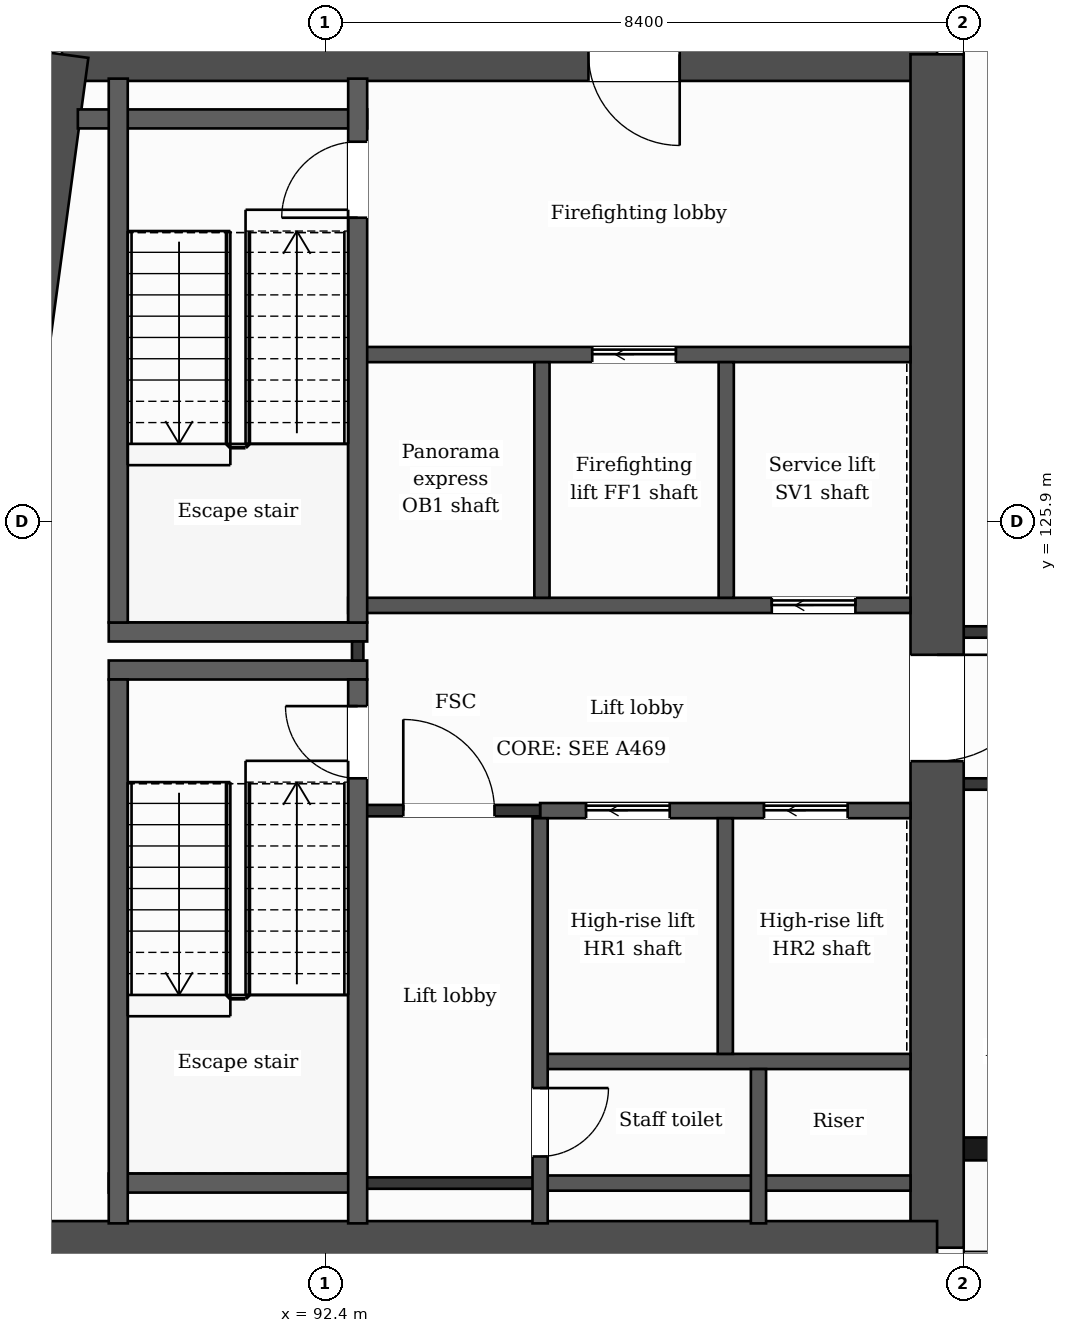
"""IFC4 building model, lengths in metres.
Left out: names, types, materials, properties, quantities, classifications, styles, units other than length and angle.
Written with IfcOpenShell. Run it as: python <this file> out.ifc"""

import sys

from ifc_helpers import new_model, si_unit, direction, frame, frame_2d, origin, place, context, subcontext, project, spatial, rectangle, extrude, element, fill, save


model = new_model("IFC4")
c1 = context("Model", 3, precision=1e-05, world=origin(), true_north=direction((0.0, 1.0)))
c2 = subcontext(c1, "Body", "Model", "MODEL_VIEW")
j1 = project(units=[si_unit("LENGTHUNIT", "METRE"), si_unit("PLANEANGLEUNIT", "RADIAN")], contexts=[c1])
p1 = place(None, origin())
s1 = spatial("IfcSite", under=j1, at=p1, CompositionType="ELEMENT")
p2 = place(p1, origin())
s2 = spatial("IfcBuilding", under=s1, at=p2, CompositionType="ELEMENT")
p3 = place(p2, frame((0.0, 0.0, 281.2)))
s3 = spatial("IfcBuildingStorey", under=s2, at=p3, CompositionType="ELEMENT", Elevation=281.2)
p4 = place(p3, frame((88.937, 132.05, 0.0), z_axis=(0.0, 0.0, 1.0), x_axis=(1.0, 0.0, 0.0)))
e1 = element("IfcWall", 1, at=p4, inside=s3, PredefinedType="SHEAR", context=c2, shape_type="SweptSolid", body=[
    extrude(rectangle(XDim=11.513, YDim=0.7, at=frame_2d((5.757, 0.0))), origin(), (0.0, 0.0, 1.0), 3.7),
])
p5 = place(p4, frame((6.927, 0.0, 0.0)))
e2 = element("IfcOpeningElement", 2, at=p5, cuts=e1, PredefinedType="OPENING", context=c2, shape_type="SweptSolid", body=[
    extrude(rectangle(XDim=1.2, YDim=2.1, at=frame_2d((0.6, 1.05))), frame((0.0, 0.36, 0.0), z_axis=(0.0, -1.0, 0.0), x_axis=(1.0, 0.0, 0.0)), (0.0, 0.0, 1.0), 0.72),
])
p6 = place(p3, frame((100.45, 132.05, 0.0), z_axis=(0.0, 0.0, 1.0), x_axis=(0.0, -1.0, 0.0)))
e3 = element("IfcWall", 3, at=p6, inside=s3, PredefinedType="SHEAR", context=c2, shape_type="SweptSolid", body=[
    extrude(rectangle(XDim=15.7, YDim=0.7, at=frame_2d((7.85, 0.0))), origin(), (0.0, 0.0, 1.0), 3.7),
])
p7 = place(p6, frame((7.9, 0.0, 0.0)))
e4 = element("IfcOpeningElement", 4, at=p7, cuts=e3, PredefinedType="OPENING", context=c2, shape_type="SweptSolid", body=[
    extrude(rectangle(XDim=1.4, YDim=2.1, at=frame_2d((0.7, 1.05))), frame((0.0, 0.36, 0.0), z_axis=(0.0, -1.0, 0.0), x_axis=(1.0, 0.0, 0.0)), (0.0, 0.0, 1.0), 0.72),
])
p8 = place(p3, frame((100.45, 116.35, 0.0), z_axis=(0.0, 0.0, 1.0), x_axis=(-1.0, 0.0, 0.0)))
e5 = element("IfcWall", 5, at=p8, inside=s3, PredefinedType="SHEAR", context=c2, shape_type="SweptSolid", body=[
    extrude(rectangle(XDim=13.627, YDim=0.7, at=frame_2d((6.813, 0.0))), origin(), (0.0, 0.0, 1.0), 3.7),
])
p9 = place(p3, frame((86.823, 116.35, 0.0), z_axis=(0.0, 0.0, 1.0), x_axis=(0.133416378607, 0.99106007382, 0.0)))
e6 = element("IfcWall", 6, at=p9, inside=s3, PredefinedType="SHEAR", context=c2, shape_type="SweptSolid", body=[
    extrude(rectangle(XDim=15.842, YDim=0.7, at=frame_2d((7.921, 0.0))), origin(), (0.0, 0.0, 1.0), 3.7),
])
p10 = place(p3, frame((100.8, 117.65, 0.0), z_axis=(0.0, 0.0, 1.0), x_axis=(1.0, 0.0, 0.0)))
e7 = element("IfcWall", 7, at=p10, inside=s3, PredefinedType="SOLIDWALL", context=c2, shape_type="SweptSolid", body=[
    extrude(rectangle(XDim=12.75, YDim=0.3, at=frame_2d((6.375, 0.0))), origin(), (0.0, 0.0, 1.0), 3.38),
])
p11 = place(p10, frame((1.55, 0.0, 0.9)))
e8 = element("IfcOpeningElement", 8, at=p11, cuts=e7, PredefinedType="OPENING", context=c2, shape_type="SweptSolid", body=[
    extrude(rectangle(XDim=1.2, YDim=2.1, at=frame_2d((0.6, 1.05))), frame((0.0, 0.16, 0.0), z_axis=(0.0, -1.0, 0.0), x_axis=(1.0, 0.0, 0.0)), (0.0, 0.0, 1.0), 0.32),
])
p12 = place(p10, frame((5.7, 0.0, 0.9)))
e9 = element("IfcOpeningElement", 9, at=p12, cuts=e7, PredefinedType="OPENING", context=c2, shape_type="SweptSolid", body=[
    extrude(rectangle(XDim=1.2, YDim=2.1, at=frame_2d((0.6, 1.05))), frame((0.0, 0.16, 0.0), z_axis=(0.0, -1.0, 0.0), x_axis=(1.0, 0.0, 0.0)), (0.0, 0.0, 1.0), 0.32),
])
p13 = place(p10, frame((9.0, 0.0, 0.0)))
e10 = element("IfcOpeningElement", 10, at=p13, cuts=e7, PredefinedType="OPENING", context=c2, shape_type="SweptSolid", body=[
    extrude(rectangle(XDim=1.2, YDim=2.4, at=frame_2d((0.6, 1.2))), frame((0.0, 0.16, 0.0), z_axis=(0.0, -1.0, 0.0), x_axis=(1.0, 0.0, 0.0)), (0.0, 0.0, 1.0), 0.32),
])
p14 = place(p10, frame((10.8, 0.0, 0.9)))
e11 = element("IfcOpeningElement", 11, at=p14, cuts=e7, PredefinedType="OPENING", context=c2, shape_type="SweptSolid", body=[
    extrude(rectangle(XDim=1.2, YDim=2.1, at=frame_2d((0.6, 1.05))), frame((0.0, 0.16, 0.0), z_axis=(0.0, -1.0, 0.0), x_axis=(1.0, 0.0, 0.0)), (0.0, 0.0, 1.0), 0.32),
])
p15 = place(p3, frame((95.227, 117.2, 0.0), z_axis=(0.0, 0.0, 1.0), x_axis=(1.0, 0.0, 0.0)))
e12 = element("IfcWall", 12, at=p15, inside=s3, PredefinedType="PARTITIONING", context=c2, shape_type="SweptSolid", body=[
    extrude(rectangle(XDim=4.873, YDim=0.2, at=frame_2d((2.437, 0.0))), origin(), (0.0, 0.0, 1.0), 3.38),
])
p16 = place(p3, frame((92.827, 117.2, 0.0), z_axis=(0.0, 0.0, 1.0), x_axis=(1.0, 0.0, 0.0)))
e13 = element("IfcWall", 13, at=p16, inside=s3, PredefinedType="PARTITIONING", context=c2, shape_type="SweptSolid", body=[
    extrude(rectangle(XDim=2.4, YDim=0.15, at=frame_2d((1.2, 0.0))), origin(), (0.0, 0.0, 1.0), 3.38),
])
p17 = place(p3, frame((89.552, 117.2, 0.0), z_axis=(0.0, 0.0, 1.0), x_axis=(1.0, 0.0, 0.0)))
e14 = element("IfcWall", 14, at=p17, inside=s3, PredefinedType="PARTITIONING", context=c2, shape_type="SweptSolid", body=[
    extrude(rectangle(XDim=3.275, YDim=0.25, at=frame_2d((1.637, 0.0))), origin(), (0.0, 0.0, 1.0), 3.38),
])
p18 = place(p3, frame((95.227, 118.8, 0.0), z_axis=(0.0, 0.0, 1.0), x_axis=(1.0, 0.0, 0.0)))
e15 = element("IfcWall", 15, at=p18, inside=s3, PredefinedType="PARTITIONING", context=c2, shape_type="SweptSolid", body=[
    extrude(rectangle(XDim=4.873, YDim=0.2, at=frame_2d((2.437, 0.0))), origin(), (0.0, 0.0, 1.0), 3.38),
])
p19 = place(p3, frame((95.227, 122.1, 0.0), z_axis=(0.0, 0.0, 1.0), x_axis=(1.0, 0.0, 0.0)))
e16 = element("IfcWall", 16, at=p19, inside=s3, PredefinedType="PARTITIONING", context=c2, shape_type="SweptSolid", body=[
    extrude(rectangle(XDim=4.873, YDim=0.2, at=frame_2d((2.437, 0.0))), origin(), (0.0, 0.0, 1.0), 3.38),
])
p20 = place(p19, frame((0.605, 0.0, 0.0)))
e17 = element("IfcOpeningElement", 17, at=p20, cuts=e16, PredefinedType="OPENING", context=c2, shape_type="SweptSolid", body=[
    extrude(rectangle(XDim=1.1, YDim=2.1, at=frame_2d((0.55, 1.05))), frame((0.0, 0.11, 0.0), z_axis=(0.0, -1.0, 0.0), x_axis=(1.0, 0.0, 0.0)), (0.0, 0.0, 1.0), 0.22),
])
p21 = place(p19, frame((2.946, 0.0, 0.0)))
e18 = element("IfcOpeningElement", 18, at=p21, cuts=e16, PredefinedType="OPENING", context=c2, shape_type="SweptSolid", body=[
    extrude(rectangle(XDim=1.1, YDim=2.1, at=frame_2d((0.55, 1.05))), frame((0.0, 0.11, 0.0), z_axis=(0.0, -1.0, 0.0), x_axis=(1.0, 0.0, 0.0)), (0.0, 0.0, 1.0), 0.22),
])
p22 = place(p3, frame((92.827, 122.1, 0.0), z_axis=(0.0, 0.0, 1.0), x_axis=(1.0, 0.0, 0.0)))
e19 = element("IfcWall", 19, at=p22, inside=s3, PredefinedType="PARTITIONING", context=c2, shape_type="SweptSolid", body=[
    extrude(rectangle(XDim=2.4, YDim=0.15, at=frame_2d((1.2, 0.0))), origin(), (0.0, 0.0, 1.0), 3.38),
])
p23 = place(p22, frame((0.6, 0.0, 0.0)))
e20 = element("IfcOpeningElement", 20, at=p23, cuts=e19, PredefinedType="OPENING", context=c2, shape_type="SweptSolid", body=[
    extrude(rectangle(XDim=1.2, YDim=2.1, at=frame_2d((0.6, 1.05))), frame((0.0, 0.085, 0.0), z_axis=(0.0, -1.0, 0.0), x_axis=(1.0, 0.0, 0.0)), (0.0, 0.0, 1.0), 0.17),
])
p24 = place(p3, frame((100.8, 122.45, 0.0), z_axis=(0.0, 0.0, 1.0), x_axis=(1.0, 0.0, 0.0)))
e21 = element("IfcWall", 21, at=p24, inside=s3, PredefinedType="PARTITIONING", context=c2, shape_type="SweptSolid", body=[
    extrude(rectangle(XDim=25.2, YDim=0.15, at=frame_2d((12.6, 0.0))), origin(), (0.0, 0.0, 1.0), 3.38),
])
p25 = place(p24, frame((0.55, 0.0, 0.0)))
e22 = element("IfcOpeningElement", 22, at=p25, cuts=e21, PredefinedType="OPENING", context=c2, shape_type="SweptSolid", body=[
    extrude(rectangle(XDim=1.0, YDim=2.1, at=frame_2d((0.5, 1.05))), frame((0.0, 0.085, 0.0), z_axis=(0.0, -1.0, 0.0), x_axis=(1.0, 0.0, 0.0)), (0.0, 0.0, 1.0), 0.17),
])
p26 = place(p24, frame((9.375, 0.0, 0.0)))
e23 = element("IfcOpeningElement", 23, at=p26, cuts=e21, PredefinedType="OPENING", context=c2, shape_type="SweptSolid", body=[
    extrude(rectangle(XDim=1.0, YDim=2.1, at=frame_2d((0.5, 1.05))), frame((0.0, 0.085, 0.0), z_axis=(0.0, -1.0, 0.0), x_axis=(1.0, 0.0, 0.0)), (0.0, 0.0, 1.0), 0.17),
])
p27 = place(p24, frame((13.23, 0.0, 0.0)))
e24 = element("IfcOpeningElement", 24, at=p27, cuts=e21, PredefinedType="OPENING", context=c2, shape_type="SweptSolid", body=[
    extrude(rectangle(XDim=1.0, YDim=2.1, at=frame_2d((0.5, 1.05))), frame((0.0, 0.085, 0.0), z_axis=(0.0, -1.0, 0.0), x_axis=(1.0, 0.0, 0.0)), (0.0, 0.0, 1.0), 0.17),
])
p28 = place(p24, frame((19.513, 0.0, 0.0)))
e25 = element("IfcOpeningElement", 25, at=p28, cuts=e21, PredefinedType="OPENING", context=c2, shape_type="SweptSolid", body=[
    extrude(rectangle(XDim=0.95, YDim=2.1, at=frame_2d((0.475, 1.05))), frame((0.0, 0.085, 0.0), z_axis=(0.0, -1.0, 0.0), x_axis=(1.0, 0.0, 0.0)), (0.0, 0.0, 1.0), 0.17),
])
p29 = place(p24, frame((21.7, 0.0, 0.0)))
e26 = element("IfcOpeningElement", 26, at=p29, cuts=e21, PredefinedType="OPENING", context=c2, shape_type="SweptSolid", body=[
    extrude(rectangle(XDim=1.0, YDim=2.1, at=frame_2d((0.5, 1.05))), frame((0.0, 0.085, 0.0), z_axis=(0.0, -1.0, 0.0), x_axis=(1.0, 0.0, 0.0)), (0.0, 0.0, 1.0), 0.17),
])
for number, where, z_axis, x_axis in (
    (27, (89.552, 123.95, 0.0), (0.0, 0.0, 1.0), (1.0, 0.0, 0.0)),
    (28, (89.552, 124.45, 0.0), (0.0, 0.0, 1.0), (1.0, 0.0, 0.0)),
):
    element("IfcWall", number, at=place(p3, frame(where, z_axis=z_axis, x_axis=x_axis)), inside=s3, PredefinedType="PARTITIONING", context=c2, shape_type="SweptSolid", body=[
        extrude(rectangle(XDim=3.4, YDim=0.25, at=frame_2d((1.7, 0.0))), origin(), (0.0, 0.0, 1.0), 3.38),
    ])
p30 = place(p3, frame((100.8, 124.45, 0.0), z_axis=(0.0, 0.0, 1.0), x_axis=(1.0, 0.0, 0.0)))
e29 = element("IfcWall", 29, at=p30, inside=s3, PredefinedType="PARTITIONING", context=c2, shape_type="SweptSolid", body=[
    extrude(rectangle(XDim=25.2, YDim=0.15, at=frame_2d((12.6, 0.0))), origin(), (0.0, 0.0, 1.0), 3.38),
])
p31 = place(p30, frame((21.075, 0.0, 0.0)))
e30 = element("IfcOpeningElement", 30, at=p31, cuts=e29, PredefinedType="OPENING", context=c2, shape_type="SweptSolid", body=[
    extrude(rectangle(XDim=1.0, YDim=2.1, at=frame_2d((0.5, 1.05))), frame((0.0, 0.085, 0.0), z_axis=(0.0, -1.0, 0.0), x_axis=(1.0, 0.0, 0.0)), (0.0, 0.0, 1.0), 0.17),
])
p32 = place(p30, frame((5.375, 0.0, 0.0)))
e31 = element("IfcOpeningElement", 31, at=p32, cuts=e29, PredefinedType="OPENING", context=c2, shape_type="SweptSolid", body=[
    extrude(rectangle(XDim=1.0, YDim=2.1, at=frame_2d((0.5, 1.05))), frame((0.0, 0.085, 0.0), z_axis=(0.0, -1.0, 0.0), x_axis=(1.0, 0.0, 0.0)), (0.0, 0.0, 1.0), 0.17),
])
p33 = place(p30, frame((12.1, 0.0, 0.0)))
e32 = element("IfcOpeningElement", 32, at=p33, cuts=e29, PredefinedType="OPENING", context=c2, shape_type="SweptSolid", body=[
    extrude(rectangle(XDim=1.0, YDim=2.1, at=frame_2d((0.5, 1.05))), frame((0.0, 0.085, 0.0), z_axis=(0.0, -1.0, 0.0), x_axis=(1.0, 0.0, 0.0)), (0.0, 0.0, 1.0), 0.17),
])
p34 = place(p30, frame((17.93, 0.0, 0.0)))
e33 = element("IfcOpeningElement", 33, at=p34, cuts=e29, PredefinedType="OPENING", context=c2, shape_type="SweptSolid", body=[
    extrude(rectangle(XDim=1.0, YDim=2.1, at=frame_2d((0.5, 1.05))), frame((0.0, 0.085, 0.0), z_axis=(0.0, -1.0, 0.0), x_axis=(1.0, 0.0, 0.0)), (0.0, 0.0, 1.0), 0.17),
])
p35 = place(p3, frame((92.702, 124.8, 0.0), z_axis=(0.0, 0.0, 1.0), x_axis=(1.0, 0.0, 0.0)))
e34 = element("IfcWall", 34, at=p35, inside=s3, PredefinedType="PARTITIONING", context=c2, shape_type="SweptSolid", body=[
    extrude(rectangle(XDim=7.398, YDim=0.2, at=frame_2d((3.699, 0.0))), origin(), (0.0, 0.0, 1.0), 3.38),
])
p36 = place(p35, frame((5.573, 0.0, 0.0)))
e35 = element("IfcOpeningElement", 35, at=p36, cuts=e34, PredefinedType="OPENING", context=c2, shape_type="SweptSolid", body=[
    extrude(rectangle(XDim=1.1, YDim=2.1, at=frame_2d((0.55, 1.05))), frame((0.0, 0.11, 0.0), z_axis=(0.0, -1.0, 0.0), x_axis=(1.0, 0.0, 0.0)), (0.0, 0.0, 1.0), 0.22),
])
p37 = place(p3, frame((92.827, 128.1, 0.0), z_axis=(0.0, 0.0, 1.0), x_axis=(1.0, 0.0, 0.0)))
e36 = element("IfcWall", 36, at=p37, inside=s3, PredefinedType="PARTITIONING", context=c2, shape_type="SweptSolid", body=[
    extrude(rectangle(XDim=7.273, YDim=0.2, at=frame_2d((3.637, 0.0))), origin(), (0.0, 0.0, 1.0), 3.38),
])
p38 = place(p37, frame((3.086, 0.0, 0.0)))
e37 = element("IfcOpeningElement", 37, at=p38, cuts=e36, PredefinedType="OPENING", context=c2, shape_type="SweptSolid", body=[
    extrude(rectangle(XDim=1.1, YDim=2.1, at=frame_2d((0.55, 1.05))), frame((0.0, 0.11, 0.0), z_axis=(0.0, -1.0, 0.0), x_axis=(1.0, 0.0, 0.0)), (0.0, 0.0, 1.0), 0.22),
])
p39 = place(p3, frame((89.146, 131.2, 0.0), z_axis=(0.0, 0.0, 1.0), x_axis=(1.0, 0.0, 0.0)))
e38 = element("IfcWall", 38, at=p39, inside=s3, PredefinedType="PARTITIONING", context=c2, shape_type="SweptSolid", body=[
    extrude(rectangle(XDim=3.806, YDim=0.25, at=frame_2d((1.903, 0.0))), origin(), (0.0, 0.0, 1.0), 3.38),
])
for number, where, z_axis, x_axis in (
    (39, (89.677, 116.67, 0.0), (0.0, 0.0, 1.0), (0.0, 1.0, 0.0)),
    (40, (89.677, 124.575, 0.0), (0.0, 0.0, 1.0), (0.0, 1.0, 0.0)),
):
    element("IfcWall", number, at=place(p3, frame(where, z_axis=z_axis, x_axis=x_axis)), inside=s3, PredefinedType="PARTITIONING", context=c2, shape_type="SweptSolid", body=[
        extrude(rectangle(XDim=7.155, YDim=0.25, at=frame_2d((3.578, 0.0))), origin(), (0.0, 0.0, 1.0), 3.38),
    ])
p40 = place(p3, frame((92.827, 124.075, 0.0), z_axis=(0.0, 0.0, 1.0), x_axis=(0.0, 1.0, 0.0)))
e41 = element("IfcWall", 41, at=p40, inside=s3, PredefinedType="PARTITIONING", context=c2, shape_type="SweptSolid", body=[
    extrude(rectangle(XDim=0.25, YDim=0.15, at=frame_2d((0.125, 0.0))), origin(), (0.0, 0.0, 1.0), 3.38),
])
p41 = place(p3, frame((92.827, 116.67, 0.0), z_axis=(0.0, 0.0, 1.0), x_axis=(0.0, 1.0, 0.0)))
e42 = element("IfcWall", 42, at=p41, inside=s3, PredefinedType="PARTITIONING", context=c2, shape_type="SweptSolid", body=[
    extrude(rectangle(XDim=7.155, YDim=0.25, at=frame_2d((3.578, 0.0))), origin(), (0.0, 0.0, 1.0), 3.38),
])
p42 = place(p41, frame((5.855, 0.0, 0.0)))
e43 = element("IfcOpeningElement", 43, at=p42, cuts=e42, PredefinedType="OPENING", context=c2, shape_type="SweptSolid", body=[
    extrude(rectangle(XDim=0.95, YDim=2.1, at=frame_2d((0.475, 1.05))), frame((0.0, 0.135, 0.0), z_axis=(0.0, -1.0, 0.0), x_axis=(1.0, 0.0, 0.0)), (0.0, 0.0, 1.0), 0.27),
])
p43 = place(p3, frame((92.827, 124.575, 0.0), z_axis=(0.0, 0.0, 1.0), x_axis=(0.0, 1.0, 0.0)))
e44 = element("IfcWall", 44, at=p43, inside=s3, PredefinedType="PARTITIONING", context=c2, shape_type="SweptSolid", body=[
    extrude(rectangle(XDim=7.155, YDim=0.25, at=frame_2d((3.578, 0.0))), origin(), (0.0, 0.0, 1.0), 3.38),
])
p44 = place(p43, frame((5.325, 0.0, 0.0)))
e45 = element("IfcOpeningElement", 45, at=p44, cuts=e44, PredefinedType="OPENING", context=c2, shape_type="SweptSolid", body=[
    extrude(rectangle(XDim=1.0, YDim=2.1, at=frame_2d((0.5, 1.05))), frame((0.0, 0.135, 0.0), z_axis=(0.0, -1.0, 0.0), x_axis=(1.0, 0.0, 0.0)), (0.0, 0.0, 1.0), 0.27),
])
p45 = place(p3, frame((95.227, 116.67, 0.0), z_axis=(0.0, 0.0, 1.0), x_axis=(0.0, 1.0, 0.0)))
e46 = element("IfcWall", 46, at=p45, inside=s3, PredefinedType="PARTITIONING", context=c2, shape_type="SweptSolid", body=[
    extrude(rectangle(XDim=5.33, YDim=0.2, at=frame_2d((2.665, 0.0))), origin(), (0.0, 0.0, 1.0), 3.38),
])
p46 = place(p45, frame((0.88, 0.0, 0.0)))
e47 = element("IfcOpeningElement", 47, at=p46, cuts=e46, PredefinedType="OPENING", context=c2, shape_type="SweptSolid", body=[
    extrude(rectangle(XDim=0.9, YDim=2.1, at=frame_2d((0.45, 1.05))), frame((0.0, 0.11, 0.0), z_axis=(0.0, -1.0, 0.0), x_axis=(1.0, 0.0, 0.0)), (0.0, 0.0, 1.0), 0.22),
])
for number, where, z_axis, x_axis in (
    (48, (95.251, 124.9, 0.0), (0.0, 0.0, 1.0), (0.0, 1.0, 0.0)),
    (49, (97.664, 118.9, 0.0), (0.0, 0.0, 1.0), (0.0, 1.0, 0.0)),
    (50, (97.676, 124.9, 0.0), (0.0, 0.0, 1.0), (0.0, 1.0, 0.0)),
):
    element("IfcWall", number, at=place(p3, frame(where, z_axis=z_axis, x_axis=x_axis)), inside=s3, PredefinedType="PARTITIONING", context=c2, shape_type="SweptSolid", body=[
        extrude(rectangle(XDim=3.1, YDim=0.2, at=frame_2d((1.55, 0.0))), origin(), (0.0, 0.0, 1.0), 3.38),
    ])
p47 = place(p3, frame((98.1, 116.67, 0.0), z_axis=(0.0, 0.0, 1.0), x_axis=(0.0, 1.0, 0.0)))
e51 = element("IfcWall", 51, at=p47, inside=s3, PredefinedType="PARTITIONING", context=c2, shape_type="SweptSolid", body=[
    extrude(rectangle(XDim=2.03, YDim=0.2, at=frame_2d((1.015, 0.0))), origin(), (0.0, 0.0, 1.0), 3.38),
])
p48 = place(p23, origin())
e52 = element("IfcDoor", 52, at=p48, inside=s3, OperationType="SINGLE_SWING_LEFT", PredefinedType="DOOR", context=c2, shape_type="SweptSolid", body=[
    extrude(rectangle(XDim=1.2, YDim=2.1, at=frame_2d((0.6, 1.05))), frame((0.0, 0.025, 0.0), z_axis=(0.0, -1.0, 0.0), x_axis=(1.0, 0.0, 0.0)), (0.0, 0.0, 1.0), 0.05),
])
fill(e20, e52)
p49 = place(p20, origin())
e53 = element("IfcDoor", 53, at=p49, inside=s3, OperationType="SLIDING_TO_LEFT", PredefinedType="DOOR", context=c2, shape_type="SweptSolid", body=[
    extrude(rectangle(XDim=1.1, YDim=2.1, at=frame_2d((0.55, 1.05))), frame((0.0, 0.025, 0.0), z_axis=(0.0, -1.0, 0.0), x_axis=(1.0, 0.0, 0.0)), (0.0, 0.0, 1.0), 0.05),
])
fill(e17, e53)
p50 = place(p21, origin())
e54 = element("IfcDoor", 54, at=p50, inside=s3, OperationType="SLIDING_TO_LEFT", PredefinedType="DOOR", context=c2, shape_type="SweptSolid", body=[
    extrude(rectangle(XDim=1.1, YDim=2.1, at=frame_2d((0.55, 1.05))), frame((0.0, 0.025, 0.0), z_axis=(0.0, -1.0, 0.0), x_axis=(1.0, 0.0, 0.0)), (0.0, 0.0, 1.0), 0.05),
])
fill(e18, e54)
p51 = place(p38, origin())
e55 = element("IfcDoor", 55, at=p51, inside=s3, OperationType="SLIDING_TO_LEFT", PredefinedType="DOOR", context=c2, shape_type="SweptSolid", body=[
    extrude(rectangle(XDim=1.1, YDim=2.1, at=frame_2d((0.55, 1.05))), frame((0.0, 0.025, 0.0), z_axis=(0.0, -1.0, 0.0), x_axis=(1.0, 0.0, 0.0)), (0.0, 0.0, 1.0), 0.05),
])
fill(e37, e55)
p52 = place(p36, origin())
e56 = element("IfcDoor", 56, at=p52, inside=s3, OperationType="SLIDING_TO_LEFT", PredefinedType="DOOR", context=c2, shape_type="SweptSolid", body=[
    extrude(rectangle(XDim=1.1, YDim=2.1, at=frame_2d((0.55, 1.05))), frame((0.0, 0.025, 0.0), z_axis=(0.0, -1.0, 0.0), x_axis=(1.0, 0.0, 0.0)), (0.0, 0.0, 1.0), 0.05),
])
fill(e35, e56)
p53 = place(p42, origin())
e57 = element("IfcDoor", 57, at=p53, inside=s3, OperationType="SINGLE_SWING_RIGHT", PredefinedType="DOOR", context=c2, shape_type="SweptSolid", body=[
    extrude(rectangle(XDim=0.95, YDim=2.1, at=frame_2d((0.475, 1.05))), frame((0.0, 0.025, 0.0), z_axis=(0.0, -1.0, 0.0), x_axis=(1.0, 0.0, 0.0)), (0.0, 0.0, 1.0), 0.05),
])
fill(e43, e57)
p54 = place(p44, origin())
e58 = element("IfcDoor", 58, at=p54, inside=s3, OperationType="SINGLE_SWING_LEFT", PredefinedType="DOOR", context=c2, shape_type="SweptSolid", body=[
    extrude(rectangle(XDim=1.0, YDim=2.1, at=frame_2d((0.5, 1.05))), frame((0.0, 0.025, 0.0), z_axis=(0.0, -1.0, 0.0), x_axis=(1.0, 0.0, 0.0)), (0.0, 0.0, 1.0), 0.05),
])
fill(e45, e58)
p55 = place(p46, origin())
e59 = element("IfcDoor", 59, at=p55, inside=s3, OperationType="SINGLE_SWING_RIGHT", PredefinedType="DOOR", context=c2, shape_type="SweptSolid", body=[
    extrude(rectangle(XDim=0.9, YDim=2.1, at=frame_2d((0.45, 1.05))), frame((0.0, 0.025, 0.0), z_axis=(0.0, -1.0, 0.0), x_axis=(1.0, 0.0, 0.0)), (0.0, 0.0, 1.0), 0.05),
])
fill(e47, e59)
p56 = place(p5, origin())
e60 = element("IfcDoor", 60, at=p56, inside=s3, OperationType="SINGLE_SWING_RIGHT", PredefinedType="DOOR", context=c2, shape_type="SweptSolid", body=[
    extrude(rectangle(XDim=1.2, YDim=2.1, at=frame_2d((0.6, 1.05))), frame((0.0, 0.025, 0.0), z_axis=(0.0, -1.0, 0.0), x_axis=(1.0, 0.0, 0.0)), (0.0, 0.0, 1.0), 0.05),
])
fill(e2, e60)
p57 = place(p7, origin())
e61 = element("IfcDoor", 61, at=p57, inside=s3, OperationType="SINGLE_SWING_LEFT", PredefinedType="DOOR", context=c2, shape_type="SweptSolid", body=[
    extrude(rectangle(XDim=1.4, YDim=2.1, at=frame_2d((0.7, 1.05))), frame((0.0, 0.025, 0.0), z_axis=(0.0, -1.0, 0.0), x_axis=(1.0, 0.0, 0.0)), (0.0, 0.0, 1.0), 0.05),
])
fill(e4, e61)
save(model, sys.argv[1])
